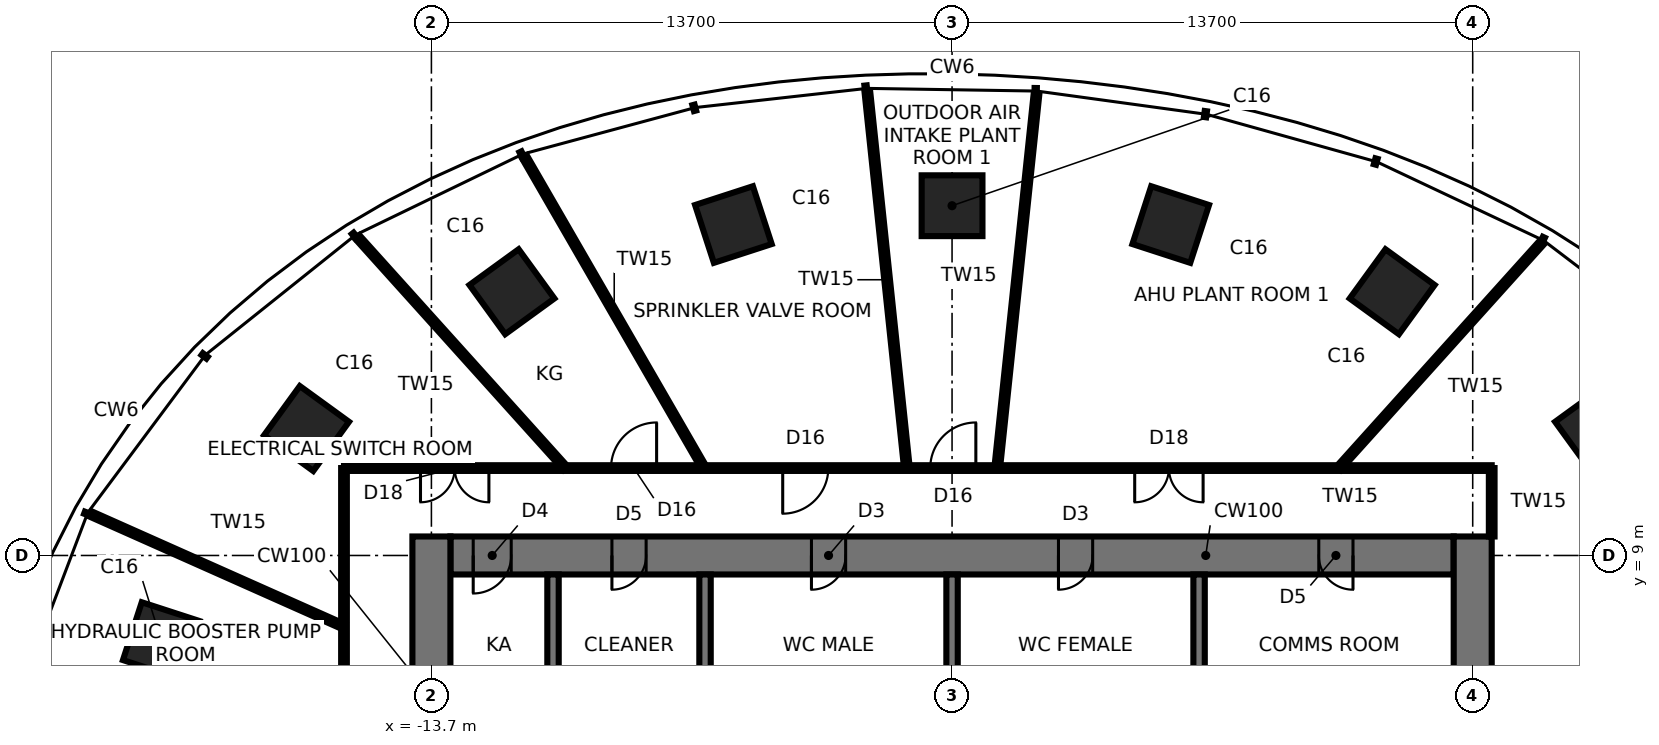
"""IFC4 building model, lengths in metres.
Left out: names, types, materials, properties, quantities, classifications, styles, units other than length and angle.
Written with IfcOpenShell. Run it as: python <this file> out.ifc"""

import sys

from ifc_helpers import new_model, si_unit, direction, frame, frame_2d, origin, origin_2d, place, context, subcontext, project, spatial, rectangle, extrude, element, fill, save


model = new_model("IFC4")
c1 = context("Model", 3, precision=1e-05, world=origin(), true_north=direction((0.0, 1.0)))
c2 = subcontext(c1, "Body", "Model", "MODEL_VIEW")
j1 = project(units=[si_unit("LENGTHUNIT", "METRE"), si_unit("PLANEANGLEUNIT", "RADIAN")], contexts=[c1])
p1 = place(None, origin())
s1 = spatial("IfcSite", under=j1, at=p1, CompositionType="ELEMENT")
p2 = place(p1, origin())
s2 = spatial("IfcBuilding", under=s1, at=p2, CompositionType="ELEMENT")
p3 = place(p2, frame((0.0, 0.0, 166.5)))
s3 = spatial("IfcBuildingStorey", under=s2, at=p3, CompositionType="ELEMENT", Elevation=166.5)
for number, where, z_axis, x_axis in (
    (1, (16.986, 12.341, 0.0), (0.0, 0.0, 1.0), (0.809, 0.588, 0.0)),
    (2, (11.581, 15.94, 0.0), (0.0, 0.0, 1.0), (0.588, 0.809, 0.0)),
    (3, (5.754, 17.708, 0.0), (0.0, 0.0, 1.0), (0.309, 0.951, 0.0)),
    (4, (0.0, 18.204, 0.0), (0.0, 0.0, 1.0), (0.0, 1.0, 0.0)),
    (5, (-5.754, 17.708, 0.0), (0.0, 0.0, 1.0), (-0.309, 0.951, 0.0)),
    (6, (-11.581, 15.94, 0.0), (0.0, 0.0, 1.0), (-0.588, 0.809, 0.0)),
    (7, (-16.986, 12.341, 0.0), (0.0, 0.0, 1.0), (-0.809, 0.588, 0.0)),
    (8, (-20.808, 6.761, 0.0), (0.0, 0.0, 1.0), (-0.951, 0.309, 0.0)),
):
    element("IfcColumn", number, at=place(p3, frame(where, z_axis=z_axis, x_axis=x_axis)), inside=s3, PredefinedType="COLUMN", context=c2, shape_type="SweptSolid", body=[
        extrude(rectangle(XDim=1.6, YDim=1.6, at=origin_2d()), origin(), (0.0, 0.0, 1.0), 5.6),
    ])
p4 = place(p3, frame((13.2, 9.0, 0.0), z_axis=(0.0, 0.0, 1.0), x_axis=(-1.0, 0.0, 0.0)))
e9 = element("IfcWall", 9, at=p4, inside=s3, PredefinedType="SHEAR", context=c2, shape_type="SweptSolid", body=[
    extrude(rectangle(XDim=26.4, YDim=1.0, at=frame_2d((13.2, 0.0))), origin(), (0.0, 0.0, 1.0), 5.6),
])
p5 = place(p4, frame((2.65, 0.0, 0.0)))
e10 = element("IfcOpeningElement", 10, at=p5, cuts=e9, PredefinedType="OPENING", context=c2, shape_type="SweptSolid", body=[
    extrude(rectangle(XDim=0.9, YDim=2.1, at=frame_2d((0.45, 1.05))), frame((0.0, 0.51, 0.0), z_axis=(0.0, -1.0, 0.0), x_axis=(1.0, 0.0, 0.0)), (0.0, 0.0, 1.0), 1.02),
])
p6 = place(p4, frame((9.5, 0.0, 0.0)))
e11 = element("IfcOpeningElement", 11, at=p6, cuts=e9, PredefinedType="OPENING", context=c2, shape_type="SweptSolid", body=[
    extrude(rectangle(XDim=0.9, YDim=2.1, at=frame_2d((0.45, 1.05))), frame((0.0, 0.51, 0.0), z_axis=(0.0, -1.0, 0.0), x_axis=(1.0, 0.0, 0.0)), (0.0, 0.0, 1.0), 1.02),
])
p7 = place(p4, frame((16.0, 0.0, 0.0)))
e12 = element("IfcOpeningElement", 12, at=p7, cuts=e9, PredefinedType="OPENING", context=c2, shape_type="SweptSolid", body=[
    extrude(rectangle(XDim=0.9, YDim=2.1, at=frame_2d((0.45, 1.05))), frame((0.0, 0.51, 0.0), z_axis=(0.0, -1.0, 0.0), x_axis=(1.0, 0.0, 0.0)), (0.0, 0.0, 1.0), 1.02),
])
p8 = place(p4, frame((21.25, 0.0, 0.0)))
e13 = element("IfcOpeningElement", 13, at=p8, cuts=e9, PredefinedType="OPENING", context=c2, shape_type="SweptSolid", body=[
    extrude(rectangle(XDim=0.9, YDim=2.1, at=frame_2d((0.45, 1.05))), frame((0.0, 0.51, 0.0), z_axis=(0.0, -1.0, 0.0), x_axis=(1.0, 0.0, 0.0)), (0.0, 0.0, 1.0), 1.02),
])
p9 = place(p4, frame((24.8, 0.0, 0.0)))
e14 = element("IfcOpeningElement", 14, at=p9, cuts=e9, PredefinedType="OPENING", context=c2, shape_type="SweptSolid", body=[
    extrude(rectangle(XDim=1.0, YDim=2.1, at=frame_2d((0.5, 1.05))), frame((0.0, 0.51, 0.0), z_axis=(0.0, -1.0, 0.0), x_axis=(1.0, 0.0, 0.0)), (0.0, 0.0, 1.0), 1.02),
])
p10 = place(p3, frame((13.7, -9.5, 0.0), z_axis=(0.0, 0.0, 1.0), x_axis=(0.0, 1.0, 0.0)))
e15 = element("IfcWall", 15, at=p10, inside=s3, PredefinedType="SHEAR", context=c2, shape_type="SweptSolid", body=[
    extrude(rectangle(XDim=19.0, YDim=1.0, at=frame_2d((9.5, 0.0))), origin(), (0.0, 0.0, 1.0), 5.6),
])
p11 = place(p10, frame((8.6, 0.0, 0.0)))
e16 = element("IfcOpeningElement", 16, at=p11, cuts=e15, PredefinedType="OPENING", context=c2, shape_type="SweptSolid", body=[
    extrude(rectangle(XDim=1.8, YDim=2.4, at=frame_2d((0.9, 1.2))), frame((0.0, 0.51, 0.0), z_axis=(0.0, -1.0, 0.0), x_axis=(1.0, 0.0, 0.0)), (0.0, 0.0, 1.0), 1.02),
])
p12 = place(p3, frame((-13.7, 9.5, 0.0), z_axis=(0.0, 0.0, 1.0), x_axis=(0.0, -1.0, 0.0)))
e17 = element("IfcWall", 17, at=p12, inside=s3, PredefinedType="SHEAR", context=c2, shape_type="SweptSolid", body=[
    extrude(rectangle(XDim=19.0, YDim=1.0, at=frame_2d((9.5, 0.0))), origin(), (0.0, 0.0, 1.0), 5.6),
])
p13 = place(p12, frame((8.6, 0.0, 0.0)))
e18 = element("IfcOpeningElement", 18, at=p13, cuts=e17, PredefinedType="OPENING", context=c2, shape_type="SweptSolid", body=[
    extrude(rectangle(XDim=1.8, YDim=2.4, at=frame_2d((0.9, 1.2))), frame((0.0, 0.51, 0.0), z_axis=(0.0, -1.0, 0.0), x_axis=(1.0, 0.0, 0.0)), (0.0, 0.0, 1.0), 1.02),
])
for number, where, z_axis, x_axis in (
    (19, (-6.5, 4.75, 0.0), (0.0, 0.0, 1.0), (0.0, 1.0, 0.0)),
    (20, (6.5, 4.75, 0.0), (0.0, 0.0, 1.0), (0.0, 1.0, 0.0)),
    (21, (0.0, 4.75, 0.0), (0.0, 0.0, 1.0), (0.0, 1.0, 0.0)),
    (22, (-10.5, 4.75, 0.0), (0.0, 0.0, 1.0), (0.0, 1.0, 0.0)),
):
    element("IfcWall", number, at=place(p3, frame(where, z_axis=z_axis, x_axis=x_axis)), inside=s3, PredefinedType="SHEAR", context=c2, shape_type="SweptSolid", body=[
        extrude(rectangle(XDim=3.75, YDim=0.3, at=frame_2d((1.875, 0.0))), origin(), (0.0, 0.0, 1.0), 5.6),
    ])
p14 = place(p3, frame((14.2, 9.5, 0.0), z_axis=(0.0, 0.0, 1.0), x_axis=(0.0, 1.0, 0.0)))
e23 = element("IfcWall", 23, at=p14, inside=s3, PredefinedType="PARTITIONING", context=c2, shape_type="SweptSolid", body=[
    extrude(rectangle(XDim=1.8, YDim=0.15, at=frame_2d((0.9, 0.0))), origin(), (0.0, 0.0, 1.0), 5.4),
])
p15 = place(p3, frame((10.175, 11.3, 0.0), z_axis=(0.0, 0.0, 1.0), x_axis=(0.669137181064, 0.743138905534, 0.0)))
e24 = element("IfcWall", 24, at=p15, inside=s3, PredefinedType="PARTITIONING", context=c2, shape_type="SweptSolid", body=[
    extrude(rectangle(XDim=7.977, YDim=0.15, at=frame_2d((3.989, 0.0))), origin(), (0.0, 0.0, 1.0), 5.4),
])
p16 = place(p3, frame((1.188, 11.3, 0.0), z_axis=(0.0, 0.0, 1.0), x_axis=(0.104531956906, 0.994521528166, 0.0)))
e25 = element("IfcWall", 25, at=p16, inside=s3, PredefinedType="PARTITIONING", context=c2, shape_type="SweptSolid", body=[
    extrude(rectangle(XDim=9.896, YDim=0.15, at=frame_2d((4.948, 0.0))), origin(), (0.0, 0.0, 1.0), 5.4),
])
p17 = place(p3, frame((14.2, 11.3, 0.0), z_axis=(0.0, 0.0, 1.0), x_axis=(-1.0, 0.0, 0.0)))
e26 = element("IfcWall", 26, at=p17, inside=s3, PredefinedType="PARTITIONING", context=c2, shape_type="SweptSolid", body=[
    extrude(rectangle(XDim=30.2, YDim=0.15, at=frame_2d((15.1, 0.0))), origin(), (0.0, 0.0, 1.0), 5.4),
])
p18 = place(p17, frame((7.594, 0.0, 0.0)))
e27 = element("IfcOpeningElement", 27, at=p18, cuts=e26, PredefinedType="OPENING", context=c2, shape_type="SweptSolid", body=[
    extrude(rectangle(XDim=1.8, YDim=2.4, at=frame_2d((0.9, 1.2))), frame((0.0, 0.085, 0.0), z_axis=(0.0, -1.0, 0.0), x_axis=(1.0, 0.0, 0.0)), (0.0, 0.0, 1.0), 0.17),
])
p19 = place(p17, frame((13.574, 0.0, 0.0)))
e28 = element("IfcOpeningElement", 28, at=p19, cuts=e26, PredefinedType="OPENING", context=c2, shape_type="SweptSolid", body=[
    extrude(rectangle(XDim=1.2, YDim=2.1, at=frame_2d((0.6, 1.05))), frame((0.0, 0.085, 0.0), z_axis=(0.0, -1.0, 0.0), x_axis=(1.0, 0.0, 0.0)), (0.0, 0.0, 1.0), 0.17),
])
p20 = place(p17, frame((17.456, 0.0, 0.0)))
e29 = element("IfcOpeningElement", 29, at=p20, cuts=e26, PredefinedType="OPENING", context=c2, shape_type="SweptSolid", body=[
    extrude(rectangle(XDim=1.2, YDim=2.1, at=frame_2d((0.6, 1.05))), frame((0.0, 0.085, 0.0), z_axis=(0.0, -1.0, 0.0), x_axis=(1.0, 0.0, 0.0)), (0.0, 0.0, 1.0), 0.17),
])
p21 = place(p17, frame((21.974, 0.0, 0.0)))
e30 = element("IfcOpeningElement", 30, at=p21, cuts=e26, PredefinedType="OPENING", context=c2, shape_type="SweptSolid", body=[
    extrude(rectangle(XDim=1.2, YDim=2.1, at=frame_2d((0.6, 1.05))), frame((0.0, 0.085, 0.0), z_axis=(0.0, -1.0, 0.0), x_axis=(1.0, 0.0, 0.0)), (0.0, 0.0, 1.0), 0.17),
])
p22 = place(p17, frame((26.387, 0.0, 0.0)))
e31 = element("IfcOpeningElement", 31, at=p22, cuts=e26, PredefinedType="OPENING", context=c2, shape_type="SweptSolid", body=[
    extrude(rectangle(XDim=1.8, YDim=2.4, at=frame_2d((0.9, 1.2))), frame((0.0, 0.085, 0.0), z_axis=(0.0, -1.0, 0.0), x_axis=(1.0, 0.0, 0.0)), (0.0, 0.0, 1.0), 0.17),
])
p23 = place(p3, frame((-1.188, 11.3, 0.0), z_axis=(0.0, 0.0, 1.0), x_axis=(-0.104522843542, 0.994522486009, 0.0)))
e32 = element("IfcWall", 32, at=p23, inside=s3, PredefinedType="PARTITIONING", context=c2, shape_type="SweptSolid", body=[
    extrude(rectangle(XDim=9.967, YDim=0.15, at=frame_2d((4.983, 0.0))), origin(), (0.0, 0.0, 1.0), 5.4),
])
p24 = place(p3, frame((-6.524, 11.3, 0.0), z_axis=(0.0, 0.0, 1.0), x_axis=(-0.499999424553, 0.866025736019, 0.0)))
e33 = element("IfcWall", 33, at=p24, inside=s3, PredefinedType="PARTITIONING", context=c2, shape_type="SweptSolid", body=[
    extrude(rectangle(XDim=9.461, YDim=0.15, at=frame_2d((4.731, 0.0))), origin(), (0.0, 0.0, 1.0), 5.4),
])
p25 = place(p3, frame((-10.175, 11.3, 0.0), z_axis=(0.0, 0.0, 1.0), x_axis=(-0.66912973832, 0.743145607062, 0.0)))
e34 = element("IfcWall", 34, at=p25, inside=s3, PredefinedType="PARTITIONING", context=c2, shape_type="SweptSolid", body=[
    extrude(rectangle(XDim=8.174, YDim=0.15, at=frame_2d((4.087, 0.0))), origin(), (0.0, 0.0, 1.0), 5.4),
])
p26 = place(p3, frame((-16.0, 7.124, 0.0), z_axis=(0.0, 0.0, 1.0), x_axis=(-0.913547973194, 0.406730993007, 0.0)))
e35 = element("IfcWall", 35, at=p26, inside=s3, PredefinedType="PARTITIONING", context=c2, shape_type="SweptSolid", body=[
    extrude(rectangle(XDim=7.301, YDim=0.15, at=frame_2d((3.65, 0.0))), origin(), (0.0, 0.0, 1.0), 5.4),
])
p27 = place(p3, frame((-16.0, 11.3, 0.0), z_axis=(0.0, 0.0, 1.0), x_axis=(0.0, -1.0, 0.0)))
e36 = element("IfcWall", 36, at=p27, inside=s3, PredefinedType="PARTITIONING", context=c2, shape_type="SweptSolid", body=[
    extrude(rectangle(XDim=22.6, YDim=0.15, at=frame_2d((11.3, 0.0))), origin(), (0.0, 0.0, 1.0), 5.4),
])
p28 = place(p27, frame((5.438, 0.0, 0.0)))
e37 = element("IfcOpeningElement", 37, at=p28, cuts=e36, PredefinedType="OPENING", context=c2, shape_type="SweptSolid", body=[
    extrude(rectangle(XDim=1.2, YDim=2.1, at=frame_2d((0.6, 1.05))), frame((0.0, 0.085, 0.0), z_axis=(0.0, -1.0, 0.0), x_axis=(1.0, 0.0, 0.0)), (0.0, 0.0, 1.0), 0.17),
])
p29 = place(p27, frame((12.261, 0.0, 0.0)))
e38 = element("IfcOpeningElement", 38, at=p29, cuts=e36, PredefinedType="OPENING", context=c2, shape_type="SweptSolid", body=[
    extrude(rectangle(XDim=1.8, YDim=2.4, at=frame_2d((0.9, 1.2))), frame((0.0, 0.085, 0.0), z_axis=(0.0, -1.0, 0.0), x_axis=(1.0, 0.0, 0.0)), (0.0, 0.0, 1.0), 0.17),
])
p30 = place(p5, origin())
e39 = element("IfcDoor", 39, at=p30, inside=s3, OperationType="SINGLE_SWING_LEFT", PredefinedType="DOOR", context=c2, shape_type="SweptSolid", body=[
    extrude(rectangle(XDim=0.82, YDim=2.06, at=frame_2d((0.45, 1.03))), frame((0.0, 0.025, 0.0), z_axis=(0.0, -1.0, 0.0), x_axis=(1.0, 0.0, 0.0)), (0.0, 0.0, 1.0), 0.05),
    extrude(rectangle(XDim=0.04, YDim=2.1, at=frame_2d((0.02, 1.05))), frame((0.0, 0.25, 0.0), z_axis=(0.0, -1.0, 0.0), x_axis=(1.0, 0.0, 0.0)), (0.0, 0.0, 1.0), 0.5),
    extrude(rectangle(XDim=0.04, YDim=2.1, at=frame_2d((0.88, 1.05))), frame((0.0, 0.25, 0.0), z_axis=(0.0, -1.0, 0.0), x_axis=(1.0, 0.0, 0.0)), (0.0, 0.0, 1.0), 0.5),
    extrude(rectangle(XDim=0.82, YDim=0.04, at=frame_2d((0.45, 2.08))), frame((0.0, 0.25, 0.0), z_axis=(0.0, -1.0, 0.0), x_axis=(1.0, 0.0, 0.0)), (0.0, 0.0, 1.0), 0.5),
])
fill(e10, e39)
p31 = place(p6, origin())
e40 = element("IfcDoor", 40, at=p31, inside=s3, OperationType="SINGLE_SWING_RIGHT", PredefinedType="DOOR", context=c2, shape_type="SweptSolid", body=[
    extrude(rectangle(XDim=0.82, YDim=2.06, at=frame_2d((0.45, 1.03))), frame((0.0, 0.025, 0.0), z_axis=(0.0, -1.0, 0.0), x_axis=(1.0, 0.0, 0.0)), (0.0, 0.0, 1.0), 0.05),
    extrude(rectangle(XDim=0.04, YDim=2.1, at=frame_2d((0.02, 1.05))), frame((0.0, 0.25, 0.0), z_axis=(0.0, -1.0, 0.0), x_axis=(1.0, 0.0, 0.0)), (0.0, 0.0, 1.0), 0.5),
    extrude(rectangle(XDim=0.04, YDim=2.1, at=frame_2d((0.88, 1.05))), frame((0.0, 0.25, 0.0), z_axis=(0.0, -1.0, 0.0), x_axis=(1.0, 0.0, 0.0)), (0.0, 0.0, 1.0), 0.5),
    extrude(rectangle(XDim=0.82, YDim=0.04, at=frame_2d((0.45, 2.08))), frame((0.0, 0.25, 0.0), z_axis=(0.0, -1.0, 0.0), x_axis=(1.0, 0.0, 0.0)), (0.0, 0.0, 1.0), 0.5),
])
fill(e11, e40)
p32 = place(p7, origin())
e41 = element("IfcDoor", 41, at=p32, inside=s3, OperationType="SINGLE_SWING_RIGHT", PredefinedType="DOOR", context=c2, shape_type="SweptSolid", body=[
    extrude(rectangle(XDim=0.82, YDim=2.06, at=frame_2d((0.45, 1.03))), frame((0.0, 0.025, 0.0), z_axis=(0.0, -1.0, 0.0), x_axis=(1.0, 0.0, 0.0)), (0.0, 0.0, 1.0), 0.05),
    extrude(rectangle(XDim=0.04, YDim=2.1, at=frame_2d((0.02, 1.05))), frame((0.0, 0.25, 0.0), z_axis=(0.0, -1.0, 0.0), x_axis=(1.0, 0.0, 0.0)), (0.0, 0.0, 1.0), 0.5),
    extrude(rectangle(XDim=0.04, YDim=2.1, at=frame_2d((0.88, 1.05))), frame((0.0, 0.25, 0.0), z_axis=(0.0, -1.0, 0.0), x_axis=(1.0, 0.0, 0.0)), (0.0, 0.0, 1.0), 0.5),
    extrude(rectangle(XDim=0.82, YDim=0.04, at=frame_2d((0.45, 2.08))), frame((0.0, 0.25, 0.0), z_axis=(0.0, -1.0, 0.0), x_axis=(1.0, 0.0, 0.0)), (0.0, 0.0, 1.0), 0.5),
])
fill(e12, e41)
p33 = place(p8, origin())
e42 = element("IfcDoor", 42, at=p33, inside=s3, OperationType="SINGLE_SWING_RIGHT", PredefinedType="DOOR", context=c2, shape_type="SweptSolid", body=[
    extrude(rectangle(XDim=0.82, YDim=2.06, at=frame_2d((0.45, 1.03))), frame((0.0, 0.025, 0.0), z_axis=(0.0, -1.0, 0.0), x_axis=(1.0, 0.0, 0.0)), (0.0, 0.0, 1.0), 0.05),
    extrude(rectangle(XDim=0.04, YDim=2.1, at=frame_2d((0.02, 1.05))), frame((0.0, 0.25, 0.0), z_axis=(0.0, -1.0, 0.0), x_axis=(1.0, 0.0, 0.0)), (0.0, 0.0, 1.0), 0.5),
    extrude(rectangle(XDim=0.04, YDim=2.1, at=frame_2d((0.88, 1.05))), frame((0.0, 0.25, 0.0), z_axis=(0.0, -1.0, 0.0), x_axis=(1.0, 0.0, 0.0)), (0.0, 0.0, 1.0), 0.5),
    extrude(rectangle(XDim=0.82, YDim=0.04, at=frame_2d((0.45, 2.08))), frame((0.0, 0.25, 0.0), z_axis=(0.0, -1.0, 0.0), x_axis=(1.0, 0.0, 0.0)), (0.0, 0.0, 1.0), 0.5),
])
fill(e13, e42)
p34 = place(p9, origin())
e43 = element("IfcDoor", 43, at=p34, inside=s3, OperationType="SINGLE_SWING_RIGHT", PredefinedType="DOOR", context=c2, shape_type="SweptSolid", body=[
    extrude(rectangle(XDim=0.92, YDim=2.06, at=frame_2d((0.5, 1.03))), frame((0.0, 0.025, 0.0), z_axis=(0.0, -1.0, 0.0), x_axis=(1.0, 0.0, 0.0)), (0.0, 0.0, 1.0), 0.05),
    extrude(rectangle(XDim=0.04, YDim=2.1, at=frame_2d((0.02, 1.05))), frame((0.0, 0.25, 0.0), z_axis=(0.0, -1.0, 0.0), x_axis=(1.0, 0.0, 0.0)), (0.0, 0.0, 1.0), 0.5),
    extrude(rectangle(XDim=0.04, YDim=2.1, at=frame_2d((0.98, 1.05))), frame((0.0, 0.25, 0.0), z_axis=(0.0, -1.0, 0.0), x_axis=(1.0, 0.0, 0.0)), (0.0, 0.0, 1.0), 0.5),
    extrude(rectangle(XDim=0.92, YDim=0.04, at=frame_2d((0.5, 2.08))), frame((0.0, 0.25, 0.0), z_axis=(0.0, -1.0, 0.0), x_axis=(1.0, 0.0, 0.0)), (0.0, 0.0, 1.0), 0.5),
])
fill(e14, e43)
p35 = place(p18, origin())
e44 = element("IfcDoor", 44, at=p35, inside=s3, OperationType="DOUBLE_DOOR_SINGLE_SWING", PredefinedType="DOOR", context=c2, shape_type="SweptSolid", body=[
    extrude(rectangle(XDim=1.8, YDim=2.4, at=frame_2d((0.9, 1.2))), frame((0.0, 0.025, 0.0), z_axis=(0.0, -1.0, 0.0), x_axis=(1.0, 0.0, 0.0)), (0.0, 0.0, 1.0), 0.05),
])
fill(e27, e44)
p36 = place(p19, frame((1.2, 0.0, 0.0), z_axis=(0.0, 0.0, 1.0), x_axis=(-1.0, 0.0, 0.0)))
e45 = element("IfcDoor", 45, at=p36, inside=s3, OperationType="SINGLE_SWING_RIGHT", PredefinedType="DOOR", context=c2, shape_type="SweptSolid", body=[
    extrude(rectangle(XDim=1.2, YDim=2.1, at=frame_2d((0.6, 1.05))), frame((0.0, 0.025, 0.0), z_axis=(0.0, -1.0, 0.0), x_axis=(1.0, 0.0, 0.0)), (0.0, 0.0, 1.0), 0.05),
])
fill(e28, e45)
p37 = place(p20, origin())
e46 = element("IfcDoor", 46, at=p37, inside=s3, OperationType="SINGLE_SWING_RIGHT", PredefinedType="DOOR", context=c2, shape_type="SweptSolid", body=[
    extrude(rectangle(XDim=1.2, YDim=2.1, at=frame_2d((0.6, 1.05))), frame((0.0, 0.025, 0.0), z_axis=(0.0, -1.0, 0.0), x_axis=(1.0, 0.0, 0.0)), (0.0, 0.0, 1.0), 0.05),
])
fill(e29, e46)
p38 = place(p21, frame((1.2, 0.0, 0.0), z_axis=(0.0, 0.0, 1.0), x_axis=(-1.0, 0.0, 0.0)))
e47 = element("IfcDoor", 47, at=p38, inside=s3, OperationType="SINGLE_SWING_RIGHT", PredefinedType="DOOR", context=c2, shape_type="SweptSolid", body=[
    extrude(rectangle(XDim=1.2, YDim=2.1, at=frame_2d((0.6, 1.05))), frame((0.0, 0.025, 0.0), z_axis=(0.0, -1.0, 0.0), x_axis=(1.0, 0.0, 0.0)), (0.0, 0.0, 1.0), 0.05),
])
fill(e30, e47)
p39 = place(p22, origin())
e48 = element("IfcDoor", 48, at=p39, inside=s3, OperationType="DOUBLE_DOOR_SINGLE_SWING", PredefinedType="DOOR", context=c2, shape_type="SweptSolid", body=[
    extrude(rectangle(XDim=1.8, YDim=2.4, at=frame_2d((0.9, 1.2))), frame((0.0, 0.025, 0.0), z_axis=(0.0, -1.0, 0.0), x_axis=(1.0, 0.0, 0.0)), (0.0, 0.0, 1.0), 0.05),
])
fill(e31, e48)
save(model, sys.argv[1])
